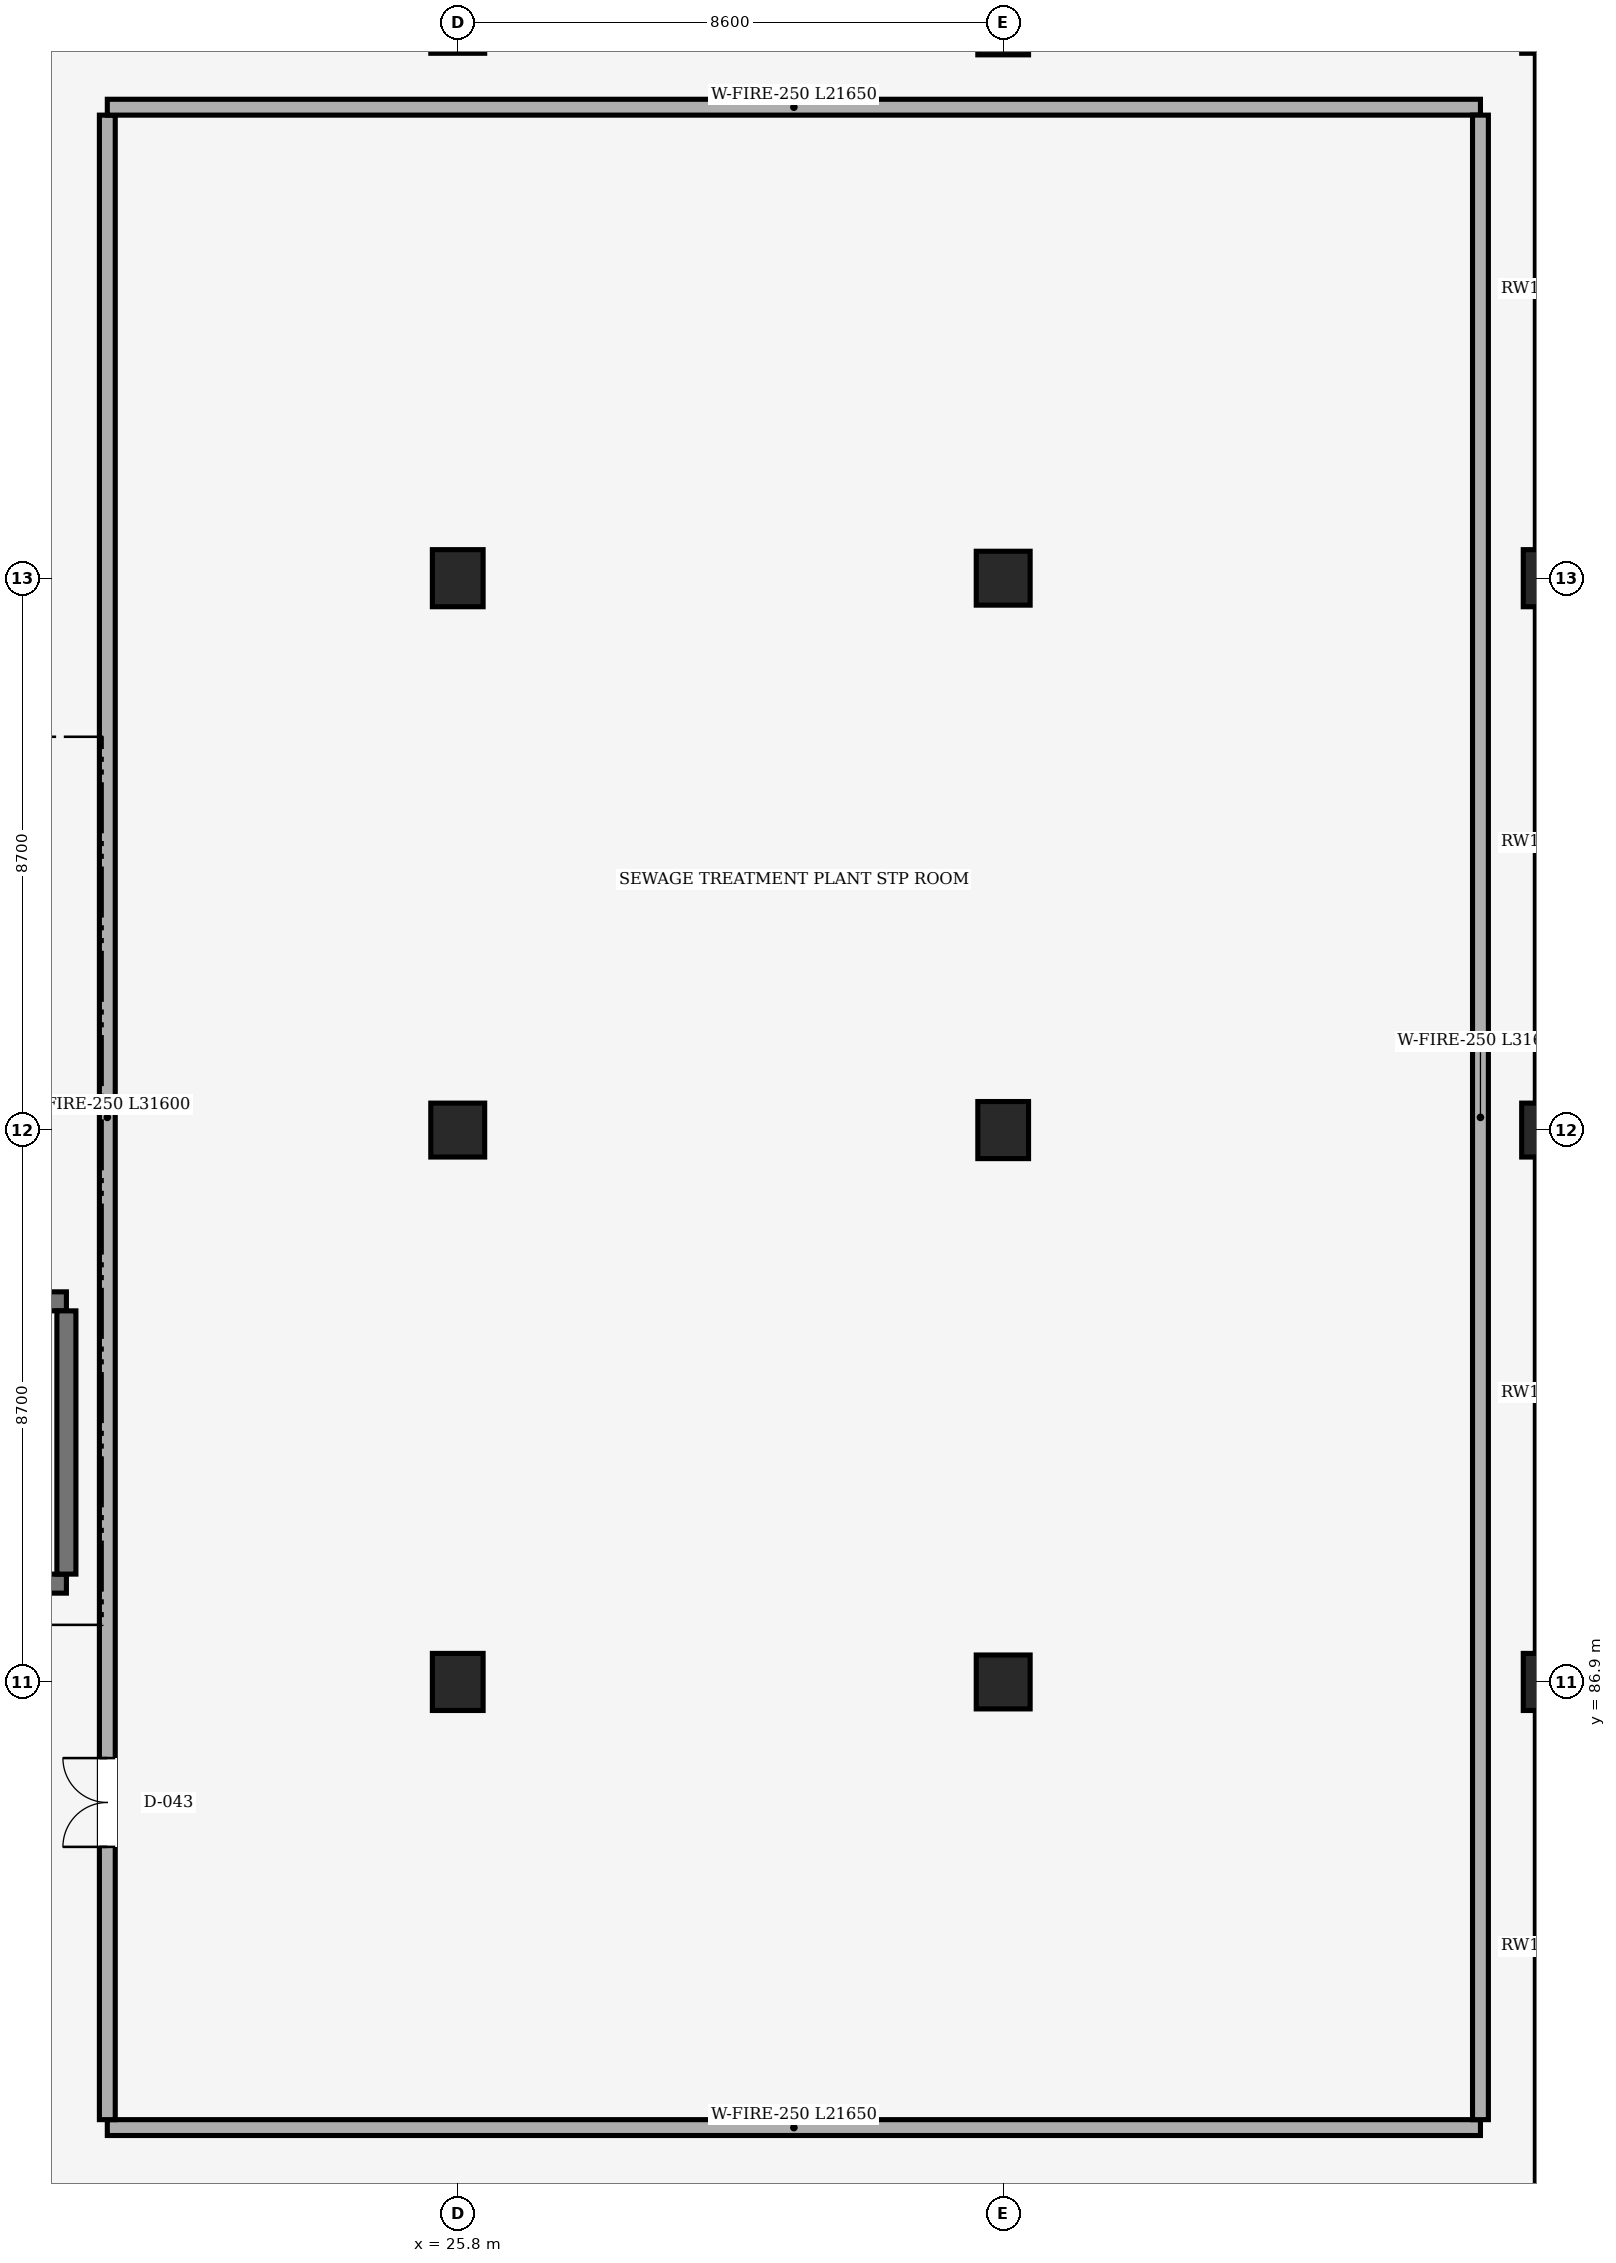
"""IFC4 building model, lengths in metres.
Left out: names, types, materials, properties, quantities, classifications, styles, units other than length and angle.
Written with IfcOpenShell. Run it as: python <this file> out.ifc"""

import sys

from ifc_helpers import new_model, si_unit, direction, frame, frame_2d, origin, origin_2d, place, context, subcontext, project, spatial, rectangle, extrude, element, fill, save


model = new_model("IFC4")
c1 = context("Model", 3, precision=1e-05, world=origin(), true_north=direction((0.0, 1.0)))
c2 = subcontext(c1, "Body", "Model", "MODEL_VIEW")
j1 = project(units=[si_unit("LENGTHUNIT", "METRE"), si_unit("PLANEANGLEUNIT", "RADIAN")], contexts=[c1])
p1 = place(None, origin())
s1 = spatial("IfcSite", under=j1, at=p1, CompositionType="ELEMENT")
p2 = place(p1, origin())
s2 = spatial("IfcBuilding", under=s1, at=p2, CompositionType="ELEMENT")
p3 = place(p2, frame((0.0, 0.0, -4.2)))
s3 = spatial("IfcBuildingStorey", under=s2, at=p3, CompositionType="ELEMENT", Elevation=-4.2)
p4 = place(p3, frame((25.8, 86.9, 0.0), z_axis=(0.0, 0.0, 1.0), x_axis=(1.0, 0.0, 0.0)))
e1 = element("IfcColumn", 1, at=p4, inside=s3, PredefinedType="COLUMN", context=c2, shape_type="SweptSolid", body=[
    extrude(rectangle(XDim=0.8, YDim=0.9, at=origin_2d()), origin(), (0.0, 0.0, 1.0), 3.92),
])
p5 = place(p3, frame((25.8, 95.6, 0.0), z_axis=(0.0, 0.0, 1.0), x_axis=(1.0, 0.0, 0.0)))
e2 = element("IfcColumn", 2, at=p5, inside=s3, PredefinedType="COLUMN", context=c2, shape_type="SweptSolid", body=[
    extrude(rectangle(XDim=0.85, YDim=0.85, at=origin_2d()), origin(), (0.0, 0.0, 1.0), 3.92),
])
p6 = place(p3, frame((25.8, 104.3, 0.0), z_axis=(0.0, 0.0, 1.0), x_axis=(1.0, 0.0, 0.0)))
e3 = element("IfcColumn", 3, at=p6, inside=s3, PredefinedType="COLUMN", context=c2, shape_type="SweptSolid", body=[
    extrude(rectangle(XDim=0.8, YDim=0.9, at=origin_2d()), origin(), (0.0, 0.0, 1.0), 3.92),
])
for number, where, z_axis, x_axis in (
    (4, (25.8, 113.0, 0.0), (0.0, 0.0, 1.0), (1.0, 0.0, 0.0)),
    (5, (34.4, 86.9, 0.0), (0.0, 0.0, 1.0), (1.0, 0.0, 0.0)),
):
    element("IfcColumn", number, at=place(p3, frame(where, z_axis=z_axis, x_axis=x_axis)), inside=s3, PredefinedType="COLUMN", context=c2, shape_type="SweptSolid", body=[
        extrude(rectangle(XDim=0.85, YDim=0.85, at=origin_2d()), origin(), (0.0, 0.0, 1.0), 3.92),
    ])
p7 = place(p3, frame((34.4, 95.6, 0.0), z_axis=(0.0, 0.0, 1.0), x_axis=(1.0, 0.0, 0.0)))
e6 = element("IfcColumn", 6, at=p7, inside=s3, PredefinedType="COLUMN", context=c2, shape_type="SweptSolid", body=[
    extrude(rectangle(XDim=0.8, YDim=0.9, at=origin_2d()), origin(), (0.0, 0.0, 1.0), 3.92),
])
p8 = place(p3, frame((34.4, 104.3, 0.0), z_axis=(0.0, 0.0, 1.0), x_axis=(1.0, 0.0, 0.0)))
e7 = element("IfcColumn", 7, at=p8, inside=s3, PredefinedType="COLUMN", context=c2, shape_type="SweptSolid", body=[
    extrude(rectangle(XDim=0.85, YDim=0.85, at=origin_2d()), origin(), (0.0, 0.0, 1.0), 3.92),
])
for number, where, z_axis, x_axis in (
    (8, (34.4, 113.0, 0.0), (0.0, 0.0, 1.0), (1.0, 0.0, 0.0)),
    (9, (43.0, 86.9, 0.0), (0.0, 0.0, 1.0), (1.0, 0.0, 0.0)),
):
    element("IfcColumn", number, at=place(p3, frame(where, z_axis=z_axis, x_axis=x_axis)), inside=s3, PredefinedType="COLUMN", context=c2, shape_type="SweptSolid", body=[
        extrude(rectangle(XDim=0.8, YDim=0.9, at=origin_2d()), origin(), (0.0, 0.0, 1.0), 3.92),
    ])
p9 = place(p3, frame((43.0, 95.6, 0.0), z_axis=(0.0, 0.0, 1.0), x_axis=(1.0, 0.0, 0.0)))
e10 = element("IfcColumn", 10, at=p9, inside=s3, PredefinedType="COLUMN", context=c2, shape_type="SweptSolid", body=[
    extrude(rectangle(XDim=0.85, YDim=0.85, at=origin_2d()), origin(), (0.0, 0.0, 1.0), 3.92),
])
p10 = place(p3, frame((43.0, 104.3, 0.0), z_axis=(0.0, 0.0, 1.0), x_axis=(1.0, 0.0, 0.0)))
e11 = element("IfcColumn", 11, at=p10, inside=s3, PredefinedType="COLUMN", context=c2, shape_type="SweptSolid", body=[
    extrude(rectangle(XDim=0.8, YDim=0.9, at=origin_2d()), origin(), (0.0, 0.0, 1.0), 3.92),
])
p11 = place(p3, frame((43.0, 113.0, 0.0), z_axis=(0.0, 0.0, 1.0), x_axis=(1.0, 0.0, 0.0)))
e12 = element("IfcColumn", 12, at=p11, inside=s3, PredefinedType="COLUMN", context=c2, shape_type="SweptSolid", body=[
    extrude(rectangle(XDim=0.85, YDim=0.85, at=origin_2d()), origin(), (0.0, 0.0, 1.0), 3.92),
])
p12 = place(p3, frame((43.0, 112.575, 0.0), z_axis=(0.0, 0.0, 1.0), x_axis=(0.0, -1.0, 0.0)))
e13 = element("IfcWall", 13, at=p12, inside=s3, PredefinedType="USERDEFINED", context=c2, shape_type="SweptSolid", body=[
    extrude(rectangle(XDim=7.825, YDim=0.42, at=frame_2d((3.913, 0.0))), origin(), (0.0, 0.0, 1.0), 3.17),
])
p13 = place(p3, frame((43.0, 103.85, 0.0), z_axis=(0.0, 0.0, 1.0), x_axis=(0.0, -1.0, 0.0)))
e14 = element("IfcWall", 14, at=p13, inside=s3, PredefinedType="USERDEFINED", context=c2, shape_type="SweptSolid", body=[
    extrude(rectangle(XDim=7.825, YDim=0.42, at=frame_2d((3.913, 0.0))), origin(), (0.0, 0.0, 1.0), 3.17),
])
for number, where, z_axis, x_axis in (
    (15, (43.0, 95.175, 0.0), (0.0, 0.0, 1.0), (0.0, -1.0, 0.0)),
    (16, (43.0, 86.45, 0.0), (0.0, 0.0, 1.0), (0.0, -1.0, 0.0)),
):
    element("IfcWall", number, at=place(p3, frame(where, z_axis=z_axis, x_axis=x_axis)), inside=s3, PredefinedType="USERDEFINED", context=c2, shape_type="SweptSolid", body=[
        extrude(rectangle(XDim=7.825, YDim=0.42, at=frame_2d((3.913, 0.0))), origin(), (0.0, 0.0, 1.0), 3.17),
    ])
for number, where, z_axis, x_axis in (
    (17, (19.63, 88.45, 0.0), (0.0, 0.0, 1.0), (-1.0, 0.0, 0.0)),
    (18, (9.45, 92.9, 0.0), (0.0, 0.0, 1.0), (1.0, 0.0, 0.0)),
):
    element("IfcWall", number, at=place(p3, frame(where, z_axis=z_axis, x_axis=x_axis)), inside=s3, PredefinedType="SHEAR", context=c2, shape_type="SweptSolid", body=[
        extrude(rectangle(XDim=10.18, YDim=0.3, at=frame_2d((5.09, 0.0))), origin(), (0.0, 0.0, 1.0), 3.92),
    ])
p14 = place(p3, frame((19.63, 92.75, 0.0), z_axis=(0.0, 0.0, 1.0), x_axis=(0.0, -1.0, 0.0)))
e19 = element("IfcWall", 19, at=p14, inside=s3, PredefinedType="SHEAR", context=c2, shape_type="SweptSolid", body=[
    extrude(rectangle(XDim=4.15, YDim=0.3, at=frame_2d((2.075, 0.0))), origin(), (0.0, 0.0, 1.0), 3.92),
])
p15 = place(p3, frame((41.925, 79.875, 0.0), z_axis=(0.0, 0.0, 1.0), x_axis=(-1.0, 0.0, 0.0)))
e20 = element("IfcWall", 20, at=p15, inside=s3, PredefinedType="SOLIDWALL", context=c2, shape_type="SweptSolid", body=[
    extrude(rectangle(XDim=21.65, YDim=0.25, at=frame_2d((10.825, 0.0))), origin(), (0.0, 0.0, 1.0), 3.9),
])
p16 = place(p3, frame((20.275, 80.0, 0.0), z_axis=(0.0, 0.0, 1.0), x_axis=(0.0, 1.0, 0.0)))
e21 = element("IfcWall", 21, at=p16, inside=s3, PredefinedType="SOLIDWALL", context=c2, shape_type="SweptSolid", body=[
    extrude(rectangle(XDim=31.6, YDim=0.25, at=frame_2d((15.8, 0.0))), origin(), (0.0, 0.0, 1.0), 3.45),
])
p17 = place(p16, frame((4.3, 0.0, 0.0)))
e22 = element("IfcOpeningElement", 22, at=p17, cuts=e21, PredefinedType="OPENING", context=c2, shape_type="SweptSolid", body=[
    extrude(rectangle(XDim=1.4, YDim=2.15, at=frame_2d((0.7, 1.075))), frame((0.0, 0.125, 0.0), z_axis=(0.0, -1.0, 0.0), x_axis=(1.0, 0.0, 0.0)), (0.0, 0.0, 1.0), 0.25),
])
p18 = place(p3, frame((20.275, 111.725, 0.0), z_axis=(0.0, 0.0, 1.0), x_axis=(1.0, 0.0, 0.0)))
e23 = element("IfcWall", 23, at=p18, inside=s3, PredefinedType="SOLIDWALL", context=c2, shape_type="SweptSolid", body=[
    extrude(rectangle(XDim=21.65, YDim=0.25, at=frame_2d((10.825, 0.0))), origin(), (0.0, 0.0, 1.0), 3.9),
])
p19 = place(p3, frame((41.925, 111.6, 0.0), z_axis=(0.0, 0.0, 1.0), x_axis=(0.0, -1.0, 0.0)))
e24 = element("IfcWall", 24, at=p19, inside=s3, PredefinedType="SOLIDWALL", context=c2, shape_type="SweptSolid", body=[
    extrude(rectangle(XDim=31.6, YDim=0.25, at=frame_2d((15.8, 0.0))), origin(), (0.0, 0.0, 1.0), 3.9),
])
p20 = place(p17, origin())
e25 = element("IfcDoor", 25, at=p20, inside=s3, OperationType="DOUBLE_DOOR_SINGLE_SWING", PredefinedType="DOOR", context=c2, shape_type="SweptSolid", body=[
    extrude(rectangle(XDim=1.4, YDim=2.15, at=frame_2d((0.7, 1.075))), frame((0.0, 0.025, 0.0), z_axis=(0.0, -1.0, 0.0), x_axis=(1.0, 0.0, 0.0)), (0.0, 0.0, 1.0), 0.05),
])
fill(e22, e25)
save(model, sys.argv[1])
